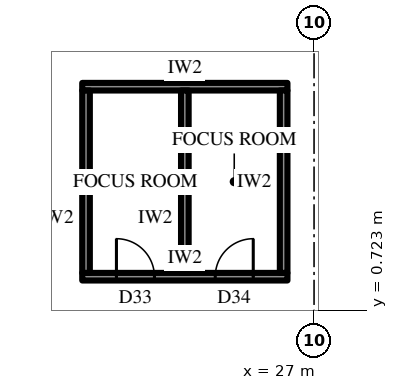
"""IFC4 building model, lengths in metres.
Left out: names, types, materials, properties, quantities, classifications, styles, units other than length and angle.
Written with IfcOpenShell. Run it as: python <this file> out.ifc"""

import sys

from ifc_helpers import new_model, si_unit, direction, frame, frame_2d, origin, place, context, subcontext, project, spatial, rectangle, extrude, element, fill, save


model = new_model("IFC4")
c1 = context("Model", 3, precision=1e-05, world=origin(), true_north=direction((0.0, 1.0)))
c2 = subcontext(c1, "Body", "Model", "MODEL_VIEW")
j1 = project(units=[si_unit("LENGTHUNIT", "METRE"), si_unit("PLANEANGLEUNIT", "RADIAN")], contexts=[c1])
p1 = place(None, origin())
s1 = spatial("IfcSite", under=j1, at=p1, CompositionType="ELEMENT")
p2 = place(p1, origin())
s2 = spatial("IfcBuilding", under=s1, at=p2, CompositionType="ELEMENT")
p3 = place(p2, frame((0.0, 0.0, 148.9)))
s3 = spatial("IfcBuildingStorey", under=s2, at=p3, CompositionType="ELEMENT", Elevation=148.9)
p4 = place(p3, frame((20.9, 1.6, 0.0), z_axis=(0.0, 0.0, 1.0), x_axis=(1.0, 0.0, 0.0)))
e1 = element("IfcWall", 1, at=p4, inside=s3, PredefinedType="PARTITIONING", context=c2, shape_type="SweptSolid", body=[
    extrude(rectangle(XDim=5.4, YDim=0.2, at=frame_2d((2.7, 0.0))), origin(), (0.0, 0.0, 1.0), 4.0),
])
p5 = place(p4, frame((0.9, 0.0, 0.0)))
e2 = element("IfcOpeningElement", 2, at=p5, cuts=e1, PredefinedType="OPENING", context=c2, shape_type="SweptSolid", body=[
    extrude(rectangle(XDim=1.0, YDim=2.2, at=frame_2d((0.5, 1.1))), frame((0.0, 0.11, 0.0), z_axis=(0.0, -1.0, 0.0), x_axis=(1.0, 0.0, 0.0)), (0.0, 0.0, 1.0), 0.22),
])
p6 = place(p4, frame((3.5, 0.0, 0.0)))
e3 = element("IfcOpeningElement", 3, at=p6, cuts=e1, PredefinedType="OPENING", context=c2, shape_type="SweptSolid", body=[
    extrude(rectangle(XDim=1.0, YDim=2.2, at=frame_2d((0.5, 1.1))), frame((0.0, 0.11, 0.0), z_axis=(0.0, -1.0, 0.0), x_axis=(1.0, 0.0, 0.0)), (0.0, 0.0, 1.0), 0.22),
])
p7 = place(p3, frame((20.9, 6.6, 0.0), z_axis=(0.0, 0.0, 1.0), x_axis=(1.0, 0.0, 0.0)))
e4 = element("IfcWall", 4, at=p7, inside=s3, PredefinedType="PARTITIONING", context=c2, shape_type="SweptSolid", body=[
    extrude(rectangle(XDim=5.4, YDim=0.2, at=frame_2d((2.7, 0.0))), origin(), (0.0, 0.0, 1.0), 4.0),
])
for number, where, z_axis, x_axis in (
    (5, (21.0, 1.7, 0.0), (0.0, 0.0, 1.0), (0.0, 1.0, 0.0)),
    (6, (23.6, 1.7, 0.0), (0.0, 0.0, 1.0), (0.0, 1.0, 0.0)),
    (7, (26.2, 1.7, 0.0), (0.0, 0.0, 1.0), (0.0, 1.0, 0.0)),
):
    element("IfcWall", number, at=place(p3, frame(where, z_axis=z_axis, x_axis=x_axis)), inside=s3, PredefinedType="PARTITIONING", context=c2, shape_type="SweptSolid", body=[
        extrude(rectangle(XDim=4.8, YDim=0.2, at=frame_2d((2.4, 0.0))), origin(), (0.0, 0.0, 1.0), 4.0),
    ])
p8 = place(p5, origin())
e8 = element("IfcDoor", 8, at=p8, inside=s3, OperationType="SINGLE_SWING_RIGHT", PredefinedType="DOOR", context=c2, shape_type="SweptSolid", body=[
    extrude(rectangle(XDim=1.0, YDim=2.2, at=frame_2d((0.5, 1.1))), frame((0.0, 0.025, 0.0), z_axis=(0.0, -1.0, 0.0), x_axis=(1.0, 0.0, 0.0)), (0.0, 0.0, 1.0), 0.05),
])
fill(e2, e8)
p9 = place(p6, origin())
e9 = element("IfcDoor", 9, at=p9, inside=s3, OperationType="SINGLE_SWING_LEFT", PredefinedType="DOOR", context=c2, shape_type="SweptSolid", body=[
    extrude(rectangle(XDim=1.0, YDim=2.2, at=frame_2d((0.5, 1.1))), frame((0.0, 0.025, 0.0), z_axis=(0.0, -1.0, 0.0), x_axis=(1.0, 0.0, 0.0)), (0.0, 0.0, 1.0), 0.05),
])
fill(e3, e9)
save(model, sys.argv[1])
